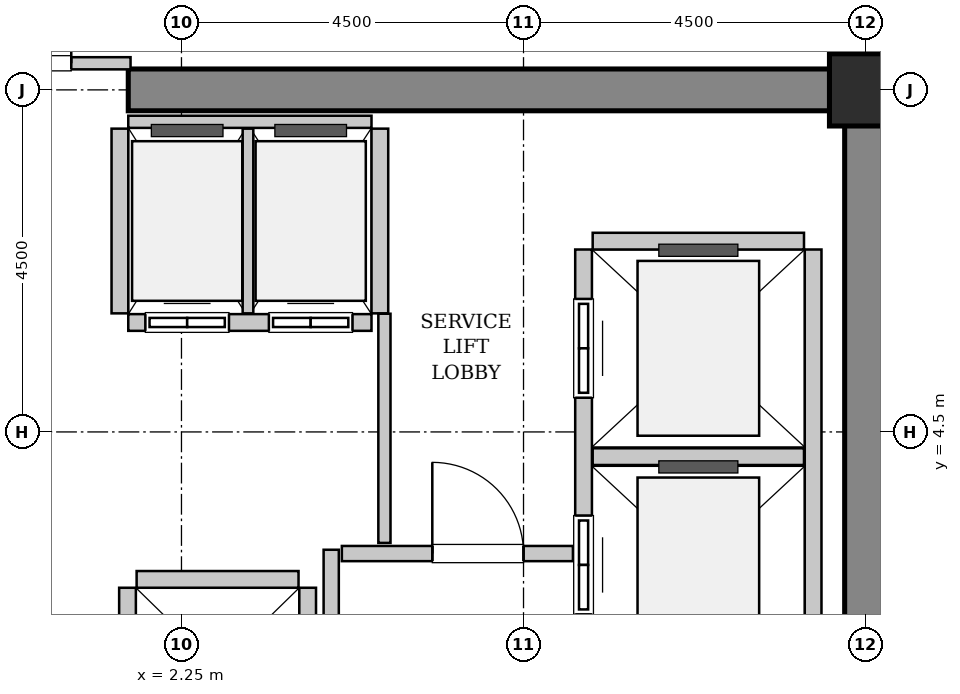
"""IFC4 building model, lengths in metres.
Left out: names, types, materials, properties, quantities, classifications, styles, units other than length and angle.
Written with IfcOpenShell. Run it as: python <this file> out.ifc"""

import sys

from ifc_helpers import new_model, si_unit, direction, frame, frame_2d, origin, origin_2d, place, context, subcontext, project, spatial, rectangle, hollow_rectangle, extrude, source, transform, mapped, element, fill, save


model = new_model("IFC4")
c1 = context("Model", 3, precision=1e-05, world=origin(), true_north=direction((0.0, 1.0)))
c2 = subcontext(c1, "Body", "Model", "MODEL_VIEW")
j1 = project(units=[si_unit("LENGTHUNIT", "METRE"), si_unit("PLANEANGLEUNIT", "RADIAN")], contexts=[c1])
p1 = place(None, origin())
s1 = spatial("IfcSite", under=j1, at=p1, CompositionType="ELEMENT")
p2 = place(p1, origin())
s2 = spatial("IfcBuilding", under=s1, at=p2, CompositionType="ELEMENT")
p3 = place(p2, frame((0.0, 0.0, 128.8)))
s3 = spatial("IfcBuildingStorey", under=s2, at=p3, CompositionType="ELEMENT", Elevation=128.8)
m1 = source(origin(), c2, "Body", "SweptSolid", [
    extrude(rectangle(XDim=9.975, YDim=0.55, at=frame_2d((4.987, 0.0))), origin(), (0.0, 0.0, 1.0), 3.8),
])
p4 = place(p3, frame((1.55, 9.0, 0.0), z_axis=(0.0, 0.0, 1.0), x_axis=(1.0, 0.0, 0.0)))
e1 = element("IfcWall", 1, at=p4, inside=s3, PredefinedType="SHEAR", context=c2, shape_type="MappedRepresentation", body=[
    mapped(m1, transform((0.0, 0.0, 0.0), x_axis=(1.0, 0.0, 0.0), y_axis=(0.0, 1.0, 0.0), z_axis=(0.0, 0.0, 1.0), scale=1.0)),
])
m2 = source(origin(), c2, "Body", "SweptSolid", [
    extrude(rectangle(XDim=7.375, YDim=0.55, at=frame_2d((3.688, 0.0))), origin(), (0.0, 0.0, 1.0), 3.8),
])
p5 = place(p3, frame((11.25, 1.35, 0.0), z_axis=(0.0, 0.0, 1.0), x_axis=(0.0, 1.0, 0.0)))
e2 = element("IfcWall", 2, at=p5, inside=s3, PredefinedType="SHEAR", context=c2, shape_type="MappedRepresentation", body=[
    mapped(m2, transform((0.0, 0.0, 0.0), x_axis=(1.0, 0.0, 0.0), y_axis=(0.0, 1.0, 0.0), z_axis=(0.0, 0.0, 1.0), scale=1.0)),
])
m3 = source(origin(), c2, "Body", "SweptSolid", [
    extrude(hollow_rectangle(XDim=0.95, YDim=0.95, WallThickness=0.045, InnerFilletRadius=0.045, OuterFilletRadius=0.09, at=origin_2d()), origin(), (0.0, 0.0, 1.0), 3.8),
])
p6 = place(p3, frame((11.25, 9.0, 0.0), z_axis=(0.0, 0.0, 1.0), x_axis=(1.0, 0.0, 0.0)))
e3 = element("IfcColumn", 3, at=p6, inside=s3, PredefinedType="COLUMN", context=c2, shape_type="MappedRepresentation", body=[
    mapped(m3, transform((0.0, 0.0, 0.0), x_axis=(1.0, 0.0, 0.0), y_axis=(0.0, 1.0, 0.0), z_axis=(0.0, 0.0, 1.0), scale=1.0)),
])
m4 = source(origin(), c2, "Body", "SweptSolid", [
    extrude(rectangle(XDim=5.45, YDim=0.22, at=frame_2d((2.725, 0.0))), origin(), (0.0, 0.0, 1.0), 3.535),
])
p7 = place(p3, frame((7.54, 6.9, 0.0), z_axis=(0.0, 0.0, 1.0), x_axis=(0.0, -1.0, 0.0)))
e4 = element("IfcWall", 4, at=p7, inside=s3, PredefinedType="SOLIDWALL", context=c2, shape_type="MappedRepresentation", body=[
    mapped(m4, transform((0.0, 0.0, 0.0), x_axis=(1.0, 0.0, 0.0), y_axis=(0.0, 1.0, 0.0), z_axis=(0.0, 0.0, 1.0), scale=1.0)),
])
p8 = place(p7, frame((3.5, 0.0, 0.0)))
e5 = element("IfcOpeningElement", 5, at=p8, cuts=e4, PredefinedType="OPENING", context=c2, shape_type="SweptSolid", body=[
    extrude(rectangle(XDim=1.3, YDim=2.3, at=frame_2d((0.65, 1.15))), frame((0.0, 0.12, 0.0), z_axis=(0.0, -1.0, 0.0), x_axis=(1.0, 0.0, 0.0)), (0.0, 0.0, 1.0), 0.24),
])
p9 = place(p7, frame((0.65, 0.0, 0.0)))
e6 = element("IfcOpeningElement", 6, at=p9, cuts=e4, PredefinedType="OPENING", context=c2, shape_type="SweptSolid", body=[
    extrude(rectangle(XDim=1.3, YDim=2.3, at=frame_2d((0.65, 1.15))), frame((0.0, 0.12, 0.0), z_axis=(0.0, -1.0, 0.0), x_axis=(1.0, 0.0, 0.0)), (0.0, 0.0, 1.0), 0.24),
])
p10 = place(p3, frame((10.56, 1.45, 0.0), z_axis=(0.0, 0.0, 1.0), x_axis=(0.0, 1.0, 0.0)))
e7 = element("IfcWall", 7, at=p10, inside=s3, PredefinedType="SOLIDWALL", context=c2, shape_type="MappedRepresentation", body=[
    mapped(m4, transform((0.0, 0.0, 0.0), x_axis=(1.0, 0.0, 0.0), y_axis=(0.0, 1.0, 0.0), z_axis=(0.0, 0.0, 1.0), scale=1.0)),
])
m5 = source(origin(), c2, "Body", "SweptSolid", [
    extrude(rectangle(XDim=2.78, YDim=0.22, at=frame_2d((1.39, 0.0))), origin(), (0.0, 0.0, 1.0), 3.535),
])
for number, where, z_axis, x_axis in (
    (8, (7.66, 4.175, 0.0), (0.0, 0.0, 1.0), (1.0, 0.0, 0.0)),
    (9, (10.44, 7.01, 0.0), (0.0, 0.0, 1.0), (-1.0, 0.0, 0.0)),
):
    element("IfcWall", number, at=place(p3, frame(where, z_axis=z_axis, x_axis=x_axis)), inside=s3, PredefinedType="SOLIDWALL", context=c2, shape_type="MappedRepresentation", body=[
        mapped(m5, transform((0.0, 0.0, 0.0), x_axis=(1.0, 0.0, 0.0), y_axis=(0.0, 1.0, 0.0), z_axis=(0.0, 0.0, 1.0), scale=1.0)),
    ])
m6 = source(origin(), c2, "Body", "SweptSolid", [
    extrude(rectangle(XDim=3.2, YDim=0.22, at=frame_2d((1.6, 0.0))), origin(), (0.0, 0.0, 1.0), 3.535),
])
p11 = place(p3, frame((1.55, 5.94, 0.0), z_axis=(0.0, 0.0, 1.0), x_axis=(1.0, 0.0, 0.0)))
e10 = element("IfcWall", 10, at=p11, inside=s3, PredefinedType="SOLIDWALL", context=c2, shape_type="MappedRepresentation", body=[
    mapped(m6, transform((0.0, 0.0, 0.0), x_axis=(1.0, 0.0, 0.0), y_axis=(0.0, 1.0, 0.0), z_axis=(0.0, 0.0, 1.0), scale=1.0)),
])
p12 = place(p11, frame((0.225, 0.0, 0.0)))
e11 = element("IfcOpeningElement", 11, at=p12, cuts=e10, PredefinedType="OPENING", context=c2, shape_type="SweptSolid", body=[
    extrude(rectangle(XDim=1.1, YDim=2.2, at=frame_2d((0.55, 1.1))), frame((0.0, 0.12, 0.0), z_axis=(0.0, -1.0, 0.0), x_axis=(1.0, 0.0, 0.0)), (0.0, 0.0, 1.0), 0.24),
])
p13 = place(p11, frame((1.85, 0.0, 0.0)))
e12 = element("IfcOpeningElement", 12, at=p13, cuts=e10, PredefinedType="OPENING", context=c2, shape_type="SweptSolid", body=[
    extrude(rectangle(XDim=1.1, YDim=2.2, at=frame_2d((0.55, 1.1))), frame((0.0, 0.12, 0.0), z_axis=(0.0, -1.0, 0.0), x_axis=(1.0, 0.0, 0.0)), (0.0, 0.0, 1.0), 0.24),
])
m7 = source(origin(), c2, "Body", "SweptSolid", [
    extrude(rectangle(XDim=3.2, YDim=0.16, at=frame_2d((1.6, 0.0))), origin(), (0.0, 0.0, 1.0), 2.425),
])
p14 = place(p3, frame((4.75, 8.58, 0.0), z_axis=(0.0, 0.0, 1.0), x_axis=(-1.0, 0.0, 0.0)))
e13 = element("IfcWall", 13, at=p14, inside=s3, PredefinedType="PARTITIONING", context=c2, shape_type="MappedRepresentation", body=[
    mapped(m7, transform((0.0, 0.0, 0.0), x_axis=(1.0, 0.0, 0.0), y_axis=(0.0, 1.0, 0.0), z_axis=(0.0, 0.0, 1.0), scale=1.0)),
])
m8 = source(origin(), c2, "Body", "SweptSolid", [
    extrude(rectangle(XDim=2.43, YDim=0.22, at=frame_2d((1.215, 0.0))), origin(), (0.0, 0.0, 1.0), 3.535),
])
p15 = place(p3, frame((1.44, 8.49, 0.0), z_axis=(0.0, 0.0, 1.0), x_axis=(0.0, -1.0, 0.0)))
e14 = element("IfcWall", 14, at=p15, inside=s3, PredefinedType="SOLIDWALL", context=c2, shape_type="MappedRepresentation", body=[
    mapped(m8, transform((0.0, 0.0, 0.0), x_axis=(1.0, 0.0, 0.0), y_axis=(0.0, 1.0, 0.0), z_axis=(0.0, 0.0, 1.0), scale=1.0)),
])
m9 = source(origin(), c2, "Body", "SweptSolid", [
    extrude(rectangle(XDim=2.43, YDim=0.14, at=frame_2d((1.215, 0.0))), origin(), (0.0, 0.0, 1.0), 3.535),
])
p16 = place(p3, frame((3.125, 6.06, 0.0), z_axis=(0.0, 0.0, 1.0), x_axis=(0.0, 1.0, 0.0)))
e15 = element("IfcWall", 15, at=p16, inside=s3, PredefinedType="PARTITIONING", context=c2, shape_type="MappedRepresentation", body=[
    mapped(m9, transform((0.0, 0.0, 0.0), x_axis=(1.0, 0.0, 0.0), y_axis=(0.0, 1.0, 0.0), z_axis=(0.0, 0.0, 1.0), scale=1.0)),
])
p17 = place(p3, frame((4.86, 6.06, 0.0), z_axis=(0.0, 0.0, 1.0), x_axis=(0.0, 1.0, 0.0)))
e16 = element("IfcWall", 16, at=p17, inside=s3, PredefinedType="SOLIDWALL", context=c2, shape_type="MappedRepresentation", body=[
    mapped(m8, transform((0.0, 0.0, 0.0), x_axis=(1.0, 0.0, 0.0), y_axis=(0.0, 1.0, 0.0), z_axis=(0.0, 0.0, 1.0), scale=1.0)),
])
m10 = source(origin(), c2, "Body", "SweptSolid", [
    extrude(rectangle(XDim=4.9, YDim=0.22, at=frame_2d((2.45, 0.0))), origin(), (0.0, 0.0, 1.0), 3.535),
])
for number, where, z_axis, x_axis in (
    (17, (1.54, 2.45, 0.0), (0.0, 0.0, 1.0), (0.0, -1.0, 0.0)),
    (18, (3.91, -2.45, 0.0), (0.0, 0.0, 1.0), (0.0, 1.0, 0.0)),
):
    element("IfcWall", number, at=place(p3, frame(where, z_axis=z_axis, x_axis=x_axis)), inside=s3, PredefinedType="SOLIDWALL", context=c2, shape_type="MappedRepresentation", body=[
        mapped(m10, transform((0.0, 0.0, 0.0), x_axis=(1.0, 0.0, 0.0), y_axis=(0.0, 1.0, 0.0), z_axis=(0.0, 0.0, 1.0), scale=1.0)),
    ])
m11 = source(origin(), c2, "Body", "SweptSolid", [
    extrude(rectangle(XDim=2.13, YDim=0.22, at=frame_2d((1.065, 0.0))), origin(), (0.0, 0.0, 1.0), 3.535),
])
p18 = place(p3, frame((3.79, 2.56, 0.0), z_axis=(0.0, 0.0, 1.0), x_axis=(-1.0, 0.0, 0.0)))
e19 = element("IfcWall", 19, at=p18, inside=s3, PredefinedType="SOLIDWALL", context=c2, shape_type="MappedRepresentation", body=[
    mapped(m11, transform((0.0, 0.0, 0.0), x_axis=(1.0, 0.0, 0.0), y_axis=(0.0, 1.0, 0.0), z_axis=(0.0, 0.0, 1.0), scale=1.0)),
])
m12 = source(origin(), c2, "Body", "SweptSolid", [
    extrude(rectangle(XDim=5.9, YDim=0.2, at=frame_2d((2.95, 0.0))), origin(), (0.0, 0.0, 1.0), 3.535),
])
p19 = place(p3, frame((4.22, -2.95, 0.0), z_axis=(0.0, 0.0, 1.0), x_axis=(0.0, 1.0, 0.0)))
e20 = element("IfcWall", 20, at=p19, inside=s3, PredefinedType="PARTITIONING", context=c2, shape_type="MappedRepresentation", body=[
    mapped(m12, transform((0.0, 0.0, 0.0), x_axis=(1.0, 0.0, 0.0), y_axis=(0.0, 1.0, 0.0), z_axis=(0.0, 0.0, 1.0), scale=1.0)),
])
m13 = source(origin(), c2, "Body", "SweptSolid", [
    extrude(rectangle(XDim=3.04, YDim=0.2, at=frame_2d((1.52, 0.0))), origin(), (0.0, 0.0, 1.0), 3.535),
])
p20 = place(p3, frame((4.36, 2.9, 0.0), z_axis=(0.0, 0.0, 1.0), x_axis=(1.0, 0.0, 0.0)))
e21 = element("IfcWall", 21, at=p20, inside=s3, PredefinedType="PARTITIONING", context=c2, shape_type="MappedRepresentation", body=[
    mapped(m13, transform((0.0, 0.0, 0.0), x_axis=(1.0, 0.0, 0.0), y_axis=(0.0, 1.0, 0.0), z_axis=(0.0, 0.0, 1.0), scale=1.0)),
])
p21 = place(p20, frame((1.19, 0.0, 0.0)))
e22 = element("IfcOpeningElement", 22, at=p21, cuts=e21, PredefinedType="OPENING", context=c2, shape_type="SweptSolid", body=[
    extrude(rectangle(XDim=1.2, YDim=2.15, at=frame_2d((0.6, 1.075))), frame((0.0, 0.11, 0.0), z_axis=(0.0, -1.0, 0.0), x_axis=(1.0, 0.0, 0.0)), (0.0, 0.0, 1.0), 0.22),
])
m14 = source(origin(), c2, "Body", "SweptSolid", [
    extrude(rectangle(XDim=3.16, YDim=0.16, at=frame_2d((1.58, 0.0))), origin(), (0.0, 0.0, 1.0), 2.425),
])
p22 = place(p3, frame((-1.58, 9.35, 0.0), z_axis=(0.0, 0.0, 1.0), x_axis=(1.0, 0.0, 0.0)))
e23 = element("IfcWall", 23, at=p22, inside=s3, PredefinedType="PARTITIONING", context=c2, shape_type="MappedRepresentation", body=[
    mapped(m14, transform((0.0, 0.0, 0.0), x_axis=(1.0, 0.0, 0.0), y_axis=(0.0, 1.0, 0.0), z_axis=(0.0, 0.0, 1.0), scale=1.0)),
])
p23 = place(p22, frame((0.78, 0.0, 0.0)))
e24 = element("IfcOpeningElement", 24, at=p23, cuts=e23, PredefinedType="OPENING", context=c2, shape_type="SweptSolid", body=[
    extrude(rectangle(XDim=1.6, YDim=2.3, at=frame_2d((0.8, 1.15))), frame((0.0, 0.09, 0.0), z_axis=(0.0, -1.0, 0.0), x_axis=(1.0, 0.0, 0.0)), (0.0, 0.0, 1.0), 0.18),
])
m15 = source(origin(), c2, "Body", "SweptSolid", [
    extrude(rectangle(XDim=3.015, YDim=0.16, at=frame_2d((1.507, 0.0))), origin(), (0.0, 0.0, 1.0), 3.535),
])
p24 = place(p3, frame((4.92, 3.04, 0.0), z_axis=(0.0, 0.0, 1.0), x_axis=(0.0, 1.0, 0.0)))
e25 = element("IfcWall", 25, at=p24, inside=s3, PredefinedType="PARTITIONING", context=c2, shape_type="MappedRepresentation", body=[
    mapped(m15, transform((0.0, 0.0, 0.0), x_axis=(1.0, 0.0, 0.0), y_axis=(0.0, 1.0, 0.0), z_axis=(0.0, 0.0, 1.0), scale=1.0)),
])
m16 = source(origin(), c2, "Body", "SweptSolid", [
    extrude(rectangle(XDim=1.3, YDim=2.3, at=frame_2d((0.65, 1.15))), frame((0.0, 0.025, 0.0), z_axis=(0.0, -1.0, 0.0), x_axis=(1.0, 0.0, 0.0)), (0.0, 0.0, 1.0), 0.05),
])
p25 = place(p8, origin())
e26 = element("IfcDoor", 26, at=p25, inside=s3, OperationType="SLIDING_TO_RIGHT", PredefinedType="DOOR", context=c2, shape_type="MappedRepresentation", body=[
    mapped(m16, transform((0.0, 0.0, 0.0), x_axis=(1.0, 0.0, 0.0), y_axis=(0.0, 1.0, 0.0), z_axis=(0.0, 0.0, 1.0), scale=1.0)),
])
fill(e5, e26)
p26 = place(p9, origin())
e27 = element("IfcDoor", 27, at=p26, inside=s3, OperationType="SLIDING_TO_RIGHT", PredefinedType="DOOR", context=c2, shape_type="MappedRepresentation", body=[
    mapped(m16, transform((0.0, 0.0, 0.0), x_axis=(1.0, 0.0, 0.0), y_axis=(0.0, 1.0, 0.0), z_axis=(0.0, 0.0, 1.0), scale=1.0)),
])
fill(e6, e27)
m17 = source(origin(), c2, "Body", "SweptSolid", [
    extrude(rectangle(XDim=1.1, YDim=2.2, at=frame_2d((0.55, 1.1))), frame((0.0, 0.025, 0.0), z_axis=(0.0, -1.0, 0.0), x_axis=(1.0, 0.0, 0.0)), (0.0, 0.0, 1.0), 0.05),
])
p27 = place(p12, origin())
e28 = element("IfcDoor", 28, at=p27, inside=s3, OperationType="DOUBLE_DOOR_SLIDING", PredefinedType="DOOR", context=c2, shape_type="MappedRepresentation", body=[
    mapped(m17, transform((0.0, 0.0, 0.0), x_axis=(1.0, 0.0, 0.0), y_axis=(0.0, 1.0, 0.0), z_axis=(0.0, 0.0, 1.0), scale=1.0)),
])
fill(e11, e28)
p28 = place(p13, origin())
e29 = element("IfcDoor", 29, at=p28, inside=s3, OperationType="DOUBLE_DOOR_SLIDING", PredefinedType="DOOR", context=c2, shape_type="MappedRepresentation", body=[
    mapped(m17, transform((0.0, 0.0, 0.0), x_axis=(1.0, 0.0, 0.0), y_axis=(0.0, 1.0, 0.0), z_axis=(0.0, 0.0, 1.0), scale=1.0)),
])
fill(e12, e29)
m18 = source(origin(), c2, "Body", "SweptSolid", [
    extrude(rectangle(XDim=1.2, YDim=2.15, at=frame_2d((0.6, 1.075))), frame((0.0, 0.025, 0.0), z_axis=(0.0, -1.0, 0.0), x_axis=(1.0, 0.0, 0.0)), (0.0, 0.0, 1.0), 0.05),
])
p29 = place(p21, origin())
e30 = element("IfcDoor", 30, at=p29, inside=s3, OperationType="SINGLE_SWING_LEFT", PredefinedType="DOOR", context=c2, shape_type="MappedRepresentation", body=[
    mapped(m18, transform((0.0, 0.0, 0.0), x_axis=(1.0, 0.0, 0.0), y_axis=(0.0, 1.0, 0.0), z_axis=(0.0, 0.0, 1.0), scale=1.0)),
])
fill(e22, e30)
m19 = source(origin(), c2, "Body", "SweptSolid", [
    extrude(rectangle(XDim=1.6, YDim=2.3, at=frame_2d((0.8, 1.15))), frame((0.0, 0.025, 0.0), z_axis=(0.0, -1.0, 0.0), x_axis=(1.0, 0.0, 0.0)), (0.0, 0.0, 1.0), 0.05),
])
p30 = place(p23, origin())
e31 = element("IfcDoor", 31, at=p30, inside=s3, OperationType="DOUBLE_DOOR_SINGLE_SWING", PredefinedType="DOOR", context=c2, shape_type="MappedRepresentation", body=[
    mapped(m19, transform((0.0, 0.0, 0.0), x_axis=(1.0, 0.0, 0.0), y_axis=(0.0, 1.0, 0.0), z_axis=(0.0, 0.0, 1.0), scale=1.0)),
])
fill(e24, e31)
save(model, sys.argv[1])
